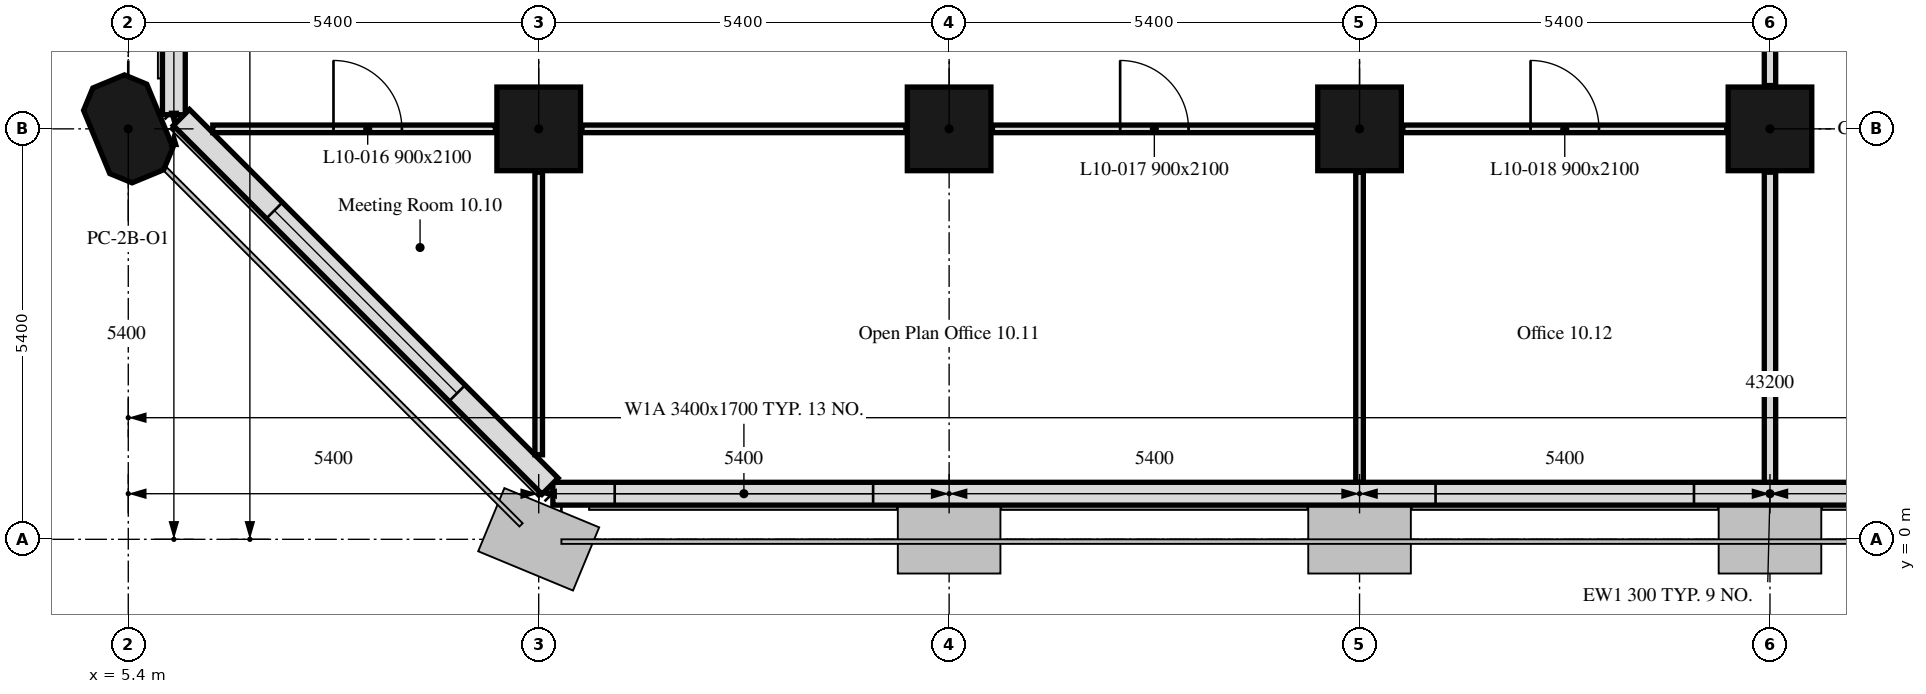
"""IFC4 building model, lengths in metres.
Left out: names, types, materials, properties, quantities, classifications, styles, units other than length and angle.
Written with IfcOpenShell. Run it as: python <this file> out.ifc"""

import sys

from ifc_helpers import new_model, si_unit, direction, frame, frame_2d, origin, origin_2d, place, context, subcontext, project, spatial, polyline, rectangle, outline, extrude, element, fill, save


model = new_model("IFC4")
c1 = context("Model", 3, precision=1e-05, world=origin(), true_north=direction((0.0, 1.0)))
c2 = subcontext(c1, "Body", "Model", "MODEL_VIEW")
j1 = project(units=[si_unit("LENGTHUNIT", "METRE"), si_unit("PLANEANGLEUNIT", "RADIAN")], contexts=[c1])
p1 = place(None, origin())
s1 = spatial("IfcSite", under=j1, at=p1, CompositionType="ELEMENT")
p2 = place(p1, origin())
s2 = spatial("IfcBuilding", under=s1, at=p2, CompositionType="ELEMENT")
p3 = place(p2, frame((0.0, 0.0, 48.8)))
s3 = spatial("IfcBuildingStorey", under=s2, at=p3, CompositionType="ELEMENT", Elevation=48.8)
p4 = place(p3, frame((5.4, 5.4, 0.0), z_axis=(0.0, 0.0, 1.0), x_axis=(-0.382683432365, 0.923879532511, 0.0)))
e1 = element("IfcColumn", 1, at=p4, inside=s3, PredefinedType="COLUMN", context=c2, shape_type="SweptSolid", body=[
    extrude(outline(polyline([(-0.45, -0.45), (0.45, -0.45), (0.675, -0.225), (0.675, 0.225), (0.45, 0.45), (-0.45, 0.45), (-0.675, 0.225), (-0.675, -0.225), (-0.45, -0.45)])), origin(), (0.0, 0.0, 1.0), 3.5),
])
for number, where, z_axis, x_axis in (
    (2, (10.8, 5.4, 0.0), (0.0, 0.0, 1.0), (1.0, 0.0, 0.0)),
    (3, (16.2, 5.4, 0.0), (0.0, 0.0, 1.0), (1.0, 0.0, 0.0)),
    (4, (21.6, 5.4, 0.0), (0.0, 0.0, 1.0), (1.0, 0.0, 0.0)),
    (5, (27.0, 5.4, 0.0), (0.0, 0.0, 1.0), (1.0, 0.0, 0.0)),
):
    element("IfcColumn", number, at=place(p3, frame(where, z_axis=z_axis, x_axis=x_axis)), inside=s3, PredefinedType="COLUMN", context=c2, shape_type="SweptSolid", body=[
        extrude(rectangle(XDim=1.1, YDim=1.1, at=origin_2d()), origin(), (0.0, 0.0, 1.0), 3.5),
    ])
p5 = place(p3, frame((10.986, 0.6, 0.0), z_axis=(0.0, 0.0, 1.0), x_axis=(1.0, 0.0, 0.0)))
e6 = element("IfcWall", 6, at=p5, inside=s3, PredefinedType="SOLIDWALL", context=c2, shape_type="SweptSolid", body=[
    extrude(rectangle(XDim=32.027, YDim=0.3, at=frame_2d((16.014, 0.0))), origin(), (0.0, 0.0, 1.0), 3.5),
])
p6 = place(p5, frame((0.814, 0.0, 0.9)))
e7 = element("IfcOpeningElement", 7, at=p6, cuts=e6, PredefinedType="OPENING", context=c2, shape_type="SweptSolid", body=[
    extrude(rectangle(XDim=3.4, YDim=1.7, at=frame_2d((1.7, 0.85))), frame((0.0, 0.16, 0.0), z_axis=(0.0, -1.0, 0.0), x_axis=(1.0, 0.0, 0.0)), (0.0, 0.0, 1.0), 0.32),
])
p7 = place(p5, frame((11.614, 0.0, 0.9)))
e8 = element("IfcOpeningElement", 8, at=p7, cuts=e6, PredefinedType="OPENING", context=c2, shape_type="SweptSolid", body=[
    extrude(rectangle(XDim=3.4, YDim=1.7, at=frame_2d((1.7, 0.85))), frame((0.0, 0.16, 0.0), z_axis=(0.0, -1.0, 0.0), x_axis=(1.0, 0.0, 0.0)), (0.0, 0.0, 1.0), 0.32),
])
p8 = place(p5, frame((22.414, 0.0, 0.9)))
e9 = element("IfcOpeningElement", 9, at=p8, cuts=e6, PredefinedType="OPENING", context=c2, shape_type="SweptSolid", body=[
    extrude(rectangle(XDim=3.4, YDim=1.7, at=frame_2d((1.7, 0.85))), frame((0.0, 0.16, 0.0), z_axis=(0.0, -1.0, 0.0), x_axis=(1.0, 0.0, 0.0)), (0.0, 0.0, 1.0), 0.32),
])
p9 = place(p3, frame((6.0, 16.2, 0.0), z_axis=(0.0, 0.0, 1.0), x_axis=(0.0, -1.0, 0.0)))
e10 = element("IfcWall", 10, at=p9, inside=s3, PredefinedType="SOLIDWALL", context=c2, shape_type="SweptSolid", body=[
    extrude(rectangle(XDim=10.614, YDim=0.3, at=frame_2d((5.307, 0.0))), origin(), (0.0, 0.0, 1.0), 3.5),
])
p10 = place(p9, frame((1.35, 0.0, 0.9)))
e11 = element("IfcOpeningElement", 11, at=p10, cuts=e10, PredefinedType="OPENING", context=c2, shape_type="SweptSolid", body=[
    extrude(rectangle(XDim=1.1, YDim=1.7, at=frame_2d((0.55, 0.85))), frame((0.0, 0.16, 0.0), z_axis=(0.0, -1.0, 0.0), x_axis=(1.0, 0.0, 0.0)), (0.0, 0.0, 1.0), 0.32),
])
p11 = place(p9, frame((2.95, 0.0, 0.9)))
e12 = element("IfcOpeningElement", 12, at=p11, cuts=e10, PredefinedType="OPENING", context=c2, shape_type="SweptSolid", body=[
    extrude(rectangle(XDim=1.1, YDim=1.7, at=frame_2d((0.55, 0.85))), frame((0.0, 0.16, 0.0), z_axis=(0.0, -1.0, 0.0), x_axis=(1.0, 0.0, 0.0)), (0.0, 0.0, 1.0), 0.32),
])
p12 = place(p3, frame((6.099, 5.55, 0.0), z_axis=(0.0, 0.0, 1.0), x_axis=(0.707106781187, -0.707106781187, 0.0)))
e13 = element("IfcWall", 13, at=p12, inside=s3, PredefinedType="SOLIDWALL", context=c2, shape_type="SweptSolid", body=[
    extrude(rectangle(XDim=6.86, YDim=0.3, at=frame_2d((3.43, 0.0))), origin(), (0.0, 0.0, 1.0), 3.5),
])
p13 = place(p12, frame((1.73, 0.0, 0.9)))
e14 = element("IfcOpeningElement", 14, at=p13, cuts=e13, PredefinedType="OPENING", context=c2, shape_type="SweptSolid", body=[
    extrude(rectangle(XDim=3.4, YDim=1.7, at=frame_2d((1.7, 0.85))), frame((0.0, 0.16, 0.0), z_axis=(0.0, -1.0, 0.0), x_axis=(1.0, 0.0, 0.0)), (0.0, 0.0, 1.0), 0.32),
])
p14 = place(p3, frame((6.512, 5.4, 0.0), z_axis=(0.0, 0.0, 1.0), x_axis=(1.0, 0.0, 0.0)))
e15 = element("IfcWall", 15, at=p14, inside=s3, PredefinedType="PARTITIONING", context=c2, shape_type="SweptSolid", body=[
    extrude(rectangle(XDim=3.718, YDim=0.1, at=frame_2d((1.859, 0.0))), origin(), (0.0, 0.0, 1.0), 3.5),
])
p15 = place(p14, frame((1.588, 0.0, 0.0)))
e16 = element("IfcOpeningElement", 16, at=p15, cuts=e15, PredefinedType="OPENING", context=c2, shape_type="SweptSolid", body=[
    extrude(rectangle(XDim=0.9, YDim=2.1, at=frame_2d((0.45, 1.05))), frame((0.0, 0.05, 0.0), z_axis=(0.0, -1.0, 0.0), x_axis=(1.0, 0.0, 0.0)), (0.0, 0.0, 1.0), 0.1),
])
p16 = place(p3, frame((11.37, 5.4, 0.0), z_axis=(0.0, 0.0, 1.0), x_axis=(1.0, 0.0, 0.0)))
e17 = element("IfcWall", 17, at=p16, inside=s3, PredefinedType="PARTITIONING", context=c2, shape_type="SweptSolid", body=[
    extrude(rectangle(XDim=4.26, YDim=0.1, at=frame_2d((2.13, 0.0))), origin(), (0.0, 0.0, 1.0), 3.5),
])
p17 = place(p3, frame((16.77, 5.4, 0.0), z_axis=(0.0, 0.0, 1.0), x_axis=(1.0, 0.0, 0.0)))
e18 = element("IfcWall", 18, at=p17, inside=s3, PredefinedType="PARTITIONING", context=c2, shape_type="SweptSolid", body=[
    extrude(rectangle(XDim=4.26, YDim=0.1, at=frame_2d((2.13, 0.0))), origin(), (0.0, 0.0, 1.0), 3.5),
])
p18 = place(p17, frame((1.68, 0.0, 0.0)))
e19 = element("IfcOpeningElement", 19, at=p18, cuts=e18, PredefinedType="OPENING", context=c2, shape_type="SweptSolid", body=[
    extrude(rectangle(XDim=0.9, YDim=2.1, at=frame_2d((0.45, 1.05))), frame((0.0, 0.05, 0.0), z_axis=(0.0, -1.0, 0.0), x_axis=(1.0, 0.0, 0.0)), (0.0, 0.0, 1.0), 0.1),
])
p19 = place(p3, frame((22.17, 5.4, 0.0), z_axis=(0.0, 0.0, 1.0), x_axis=(1.0, 0.0, 0.0)))
e20 = element("IfcWall", 20, at=p19, inside=s3, PredefinedType="PARTITIONING", context=c2, shape_type="SweptSolid", body=[
    extrude(rectangle(XDim=4.26, YDim=0.1, at=frame_2d((2.13, 0.0))), origin(), (0.0, 0.0, 1.0), 3.5),
])
p20 = place(p19, frame((1.68, 0.0, 0.0)))
e21 = element("IfcOpeningElement", 21, at=p20, cuts=e20, PredefinedType="OPENING", context=c2, shape_type="SweptSolid", body=[
    extrude(rectangle(XDim=0.9, YDim=2.1, at=frame_2d((0.45, 1.05))), frame((0.0, 0.05, 0.0), z_axis=(0.0, -1.0, 0.0), x_axis=(1.0, 0.0, 0.0)), (0.0, 0.0, 1.0), 0.1),
])
p21 = place(p3, frame((27.0, 5.97, 0.0), z_axis=(0.0, 0.0, 1.0), x_axis=(0.0, 1.0, 0.0)))
e22 = element("IfcWall", 22, at=p21, inside=s3, PredefinedType="PARTITIONING", context=c2, shape_type="SweptSolid", body=[
    extrude(rectangle(XDim=4.26, YDim=0.15, at=frame_2d((2.13, 0.0))), origin(), (0.0, 0.0, 1.0), 2.75),
])
p22 = place(p3, frame((10.8, 1.112, 0.0), z_axis=(0.0, 0.0, 1.0), x_axis=(0.0, 1.0, 0.0)))
e23 = element("IfcWall", 23, at=p22, inside=s3, PredefinedType="PARTITIONING", context=c2, shape_type="SweptSolid", body=[
    extrude(rectangle(XDim=3.718, YDim=0.1, at=frame_2d((1.859, 0.0))), origin(), (0.0, 0.0, 1.0), 3.5),
])
p23 = place(p3, frame((21.6, 0.751, 0.0), z_axis=(0.0, 0.0, 1.0), x_axis=(0.0, 1.0, 0.0)))
e24 = element("IfcWall", 24, at=p23, inside=s3, PredefinedType="PARTITIONING", context=c2, shape_type="SweptSolid", body=[
    extrude(rectangle(XDim=4.079, YDim=0.1, at=frame_2d((2.04, 0.0))), origin(), (0.0, 0.0, 1.0), 2.75),
])
p24 = place(p3, frame((27.0, 0.751, 0.0), z_axis=(0.0, 0.0, 1.0), x_axis=(0.0, 1.0, 0.0)))
e25 = element("IfcWall", 25, at=p24, inside=s3, PredefinedType="PARTITIONING", context=c2, shape_type="SweptSolid", body=[
    extrude(rectangle(XDim=4.079, YDim=0.15, at=frame_2d((2.04, 0.0))), origin(), (0.0, 0.0, 1.0), 2.75),
])
p25 = place(p6, origin())
e26 = element("IfcWindow", 26, at=p25, inside=s3, PartitioningType="SINGLE_PANEL", PredefinedType="WINDOW", context=c2, shape_type="SweptSolid", body=[
    extrude(rectangle(XDim=3.4, YDim=1.7, at=frame_2d((1.7, 0.85))), frame((0.0, 0.03, 0.0), z_axis=(0.0, -1.0, 0.0), x_axis=(1.0, 0.0, 0.0)), (0.0, 0.0, 1.0), 0.06),
])
fill(e7, e26)
p26 = place(p7, origin())
e27 = element("IfcWindow", 27, at=p26, inside=s3, PartitioningType="SINGLE_PANEL", PredefinedType="WINDOW", context=c2, shape_type="SweptSolid", body=[
    extrude(rectangle(XDim=3.4, YDim=1.7, at=frame_2d((1.7, 0.85))), frame((0.0, 0.03, 0.0), z_axis=(0.0, -1.0, 0.0), x_axis=(1.0, 0.0, 0.0)), (0.0, 0.0, 1.0), 0.06),
])
fill(e8, e27)
p27 = place(p13, origin())
e28 = element("IfcWindow", 28, at=p27, inside=s3, PartitioningType="SINGLE_PANEL", PredefinedType="WINDOW", context=c2, shape_type="SweptSolid", body=[
    extrude(rectangle(XDim=3.4, YDim=1.7, at=frame_2d((1.7, 0.85))), frame((0.0, 0.03, 0.0), z_axis=(0.0, -1.0, 0.0), x_axis=(1.0, 0.0, 0.0)), (0.0, 0.0, 1.0), 0.06),
])
fill(e14, e28)
p28 = place(p15, origin())
e29 = element("IfcDoor", 29, at=p28, inside=s3, OperationType="SINGLE_SWING_RIGHT", PredefinedType="DOOR", context=c2, shape_type="SweptSolid", body=[
    extrude(rectangle(XDim=0.9, YDim=2.1, at=frame_2d((0.45, 1.05))), frame((0.0, 0.025, 0.0), z_axis=(0.0, -1.0, 0.0), x_axis=(1.0, 0.0, 0.0)), (0.0, 0.0, 1.0), 0.05),
])
fill(e16, e29)
p29 = place(p18, origin())
e30 = element("IfcDoor", 30, at=p29, inside=s3, OperationType="SINGLE_SWING_RIGHT", PredefinedType="DOOR", context=c2, shape_type="SweptSolid", body=[
    extrude(rectangle(XDim=0.9, YDim=2.1, at=frame_2d((0.45, 1.05))), frame((0.0, 0.025, 0.0), z_axis=(0.0, -1.0, 0.0), x_axis=(1.0, 0.0, 0.0)), (0.0, 0.0, 1.0), 0.05),
])
fill(e19, e30)
p30 = place(p20, origin())
e31 = element("IfcDoor", 31, at=p30, inside=s3, OperationType="SINGLE_SWING_RIGHT", PredefinedType="DOOR", context=c2, shape_type="SweptSolid", body=[
    extrude(rectangle(XDim=0.9, YDim=2.1, at=frame_2d((0.45, 1.05))), frame((0.0, 0.025, 0.0), z_axis=(0.0, -1.0, 0.0), x_axis=(1.0, 0.0, 0.0)), (0.0, 0.0, 1.0), 0.05),
])
fill(e21, e31)
save(model, sys.argv[1])
